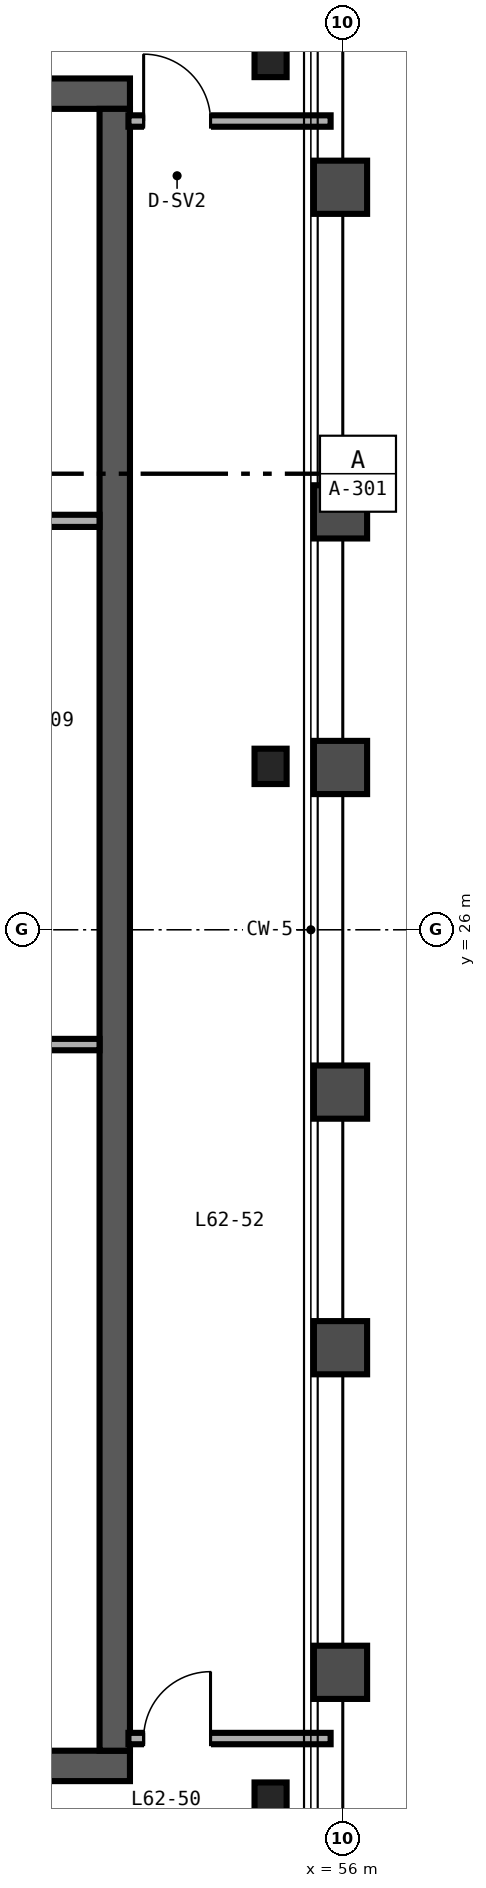
"""IFC4 building model, lengths in metres.
Left out: names, types, materials, properties, quantities, classifications, styles, units other than length and angle.
Written with IfcOpenShell. Run it as: python <this file> out.ifc"""

import sys

from ifc_helpers import new_model, si_unit, direction, frame, frame_2d, origin, origin_2d, place, context, subcontext, project, spatial, rectangle, i_section, extrude, source, transform, mapped, element, fill, save


model = new_model("IFC4")
c1 = context("Model", 3, precision=1e-05, world=origin(), true_north=direction((0.0, 1.0)))
c2 = subcontext(c1, "Body", "Model", "MODEL_VIEW")
j1 = project(units=[si_unit("LENGTHUNIT", "METRE"), si_unit("PLANEANGLEUNIT", "RADIAN")], contexts=[c1])
p1 = place(None, origin())
s1 = spatial("IfcSite", under=j1, at=p1, CompositionType="ELEMENT")
p2 = place(p1, origin())
s2 = spatial("IfcBuilding", under=s1, at=p2, CompositionType="ELEMENT")
p3 = place(p2, frame((0.0, 0.0, 247.2)))
s3 = spatial("IfcBuildingStorey", under=s2, at=p3, CompositionType="ELEMENT", Elevation=247.2)
p4 = place(p3, frame((40.8, 15.0, 0.0), z_axis=(0.0, 0.0, 1.0), x_axis=(1.0, 0.0, 0.0)))
e1 = element("IfcWall", 1, at=p4, inside=s3, PredefinedType="SHEAR", context=c2, shape_type="SweptSolid", body=[
    extrude(rectangle(XDim=12.4, YDim=0.4, at=frame_2d((6.2, 0.0))), origin(), (0.0, 0.0, 1.0), 3.38),
])
p5 = place(p4, frame((4.3, 0.0, 0.0)))
e2 = element("IfcOpeningElement", 2, at=p5, cuts=e1, PredefinedType="OPENING", context=c2, shape_type="SweptSolid", body=[
    extrude(rectangle(XDim=1.0, YDim=2.15, at=frame_2d((0.5, 1.075))), frame((0.0, 0.21, 0.0), z_axis=(0.0, -1.0, 0.0), x_axis=(1.0, 0.0, 0.0)), (0.0, 0.0, 1.0), 0.42),
])
p6 = place(p3, frame((40.8, 37.0, 0.0), z_axis=(0.0, 0.0, 1.0), x_axis=(1.0, 0.0, 0.0)))
e3 = element("IfcWall", 3, at=p6, inside=s3, PredefinedType="SHEAR", context=c2, shape_type="SweptSolid", body=[
    extrude(rectangle(XDim=12.4, YDim=0.4, at=frame_2d((6.2, 0.0))), origin(), (0.0, 0.0, 1.0), 3.38),
])
p7 = place(p6, frame((9.9, 0.0, 0.0)))
e4 = element("IfcOpeningElement", 4, at=p7, cuts=e3, PredefinedType="OPENING", context=c2, shape_type="SweptSolid", body=[
    extrude(rectangle(XDim=1.1, YDim=2.15, at=frame_2d((0.55, 1.075))), frame((0.0, 0.21, 0.0), z_axis=(0.0, -1.0, 0.0), x_axis=(1.0, 0.0, 0.0)), (0.0, 0.0, 1.0), 0.42),
])
p8 = place(p3, frame((53.0, 15.2, 0.0), z_axis=(0.0, 0.0, 1.0), x_axis=(0.0, 1.0, 0.0)))
e5 = element("IfcWall", 5, at=p8, inside=s3, PredefinedType="SHEAR", context=c2, shape_type="SweptSolid", body=[
    extrude(rectangle(XDim=21.6, YDim=0.4, at=frame_2d((10.8, 0.0))), origin(), (0.0, 0.0, 1.0), 3.38),
])
m1 = source(origin(), c2, "Body", "SweptSolid", [
    extrude(i_section(OverallWidth=0.422, OverallDepth=0.465, WebThickness=0.045, FlangeThickness=0.073, FilletRadius=0.025, at=origin_2d()), origin(), (0.0, 0.0, 1.0), 3.38),
])
for number, where, z_axis, x_axis in (
    (6, (55.05, 14.55, 0.0), (0.0, 0.0, 1.0), (1.0, 0.0, 0.0)),
    (7, (55.05, 28.15, 0.0), (0.0, 0.0, 1.0), (1.0, 0.0, 0.0)),
    (8, (55.05, 37.45, 0.0), (0.0, 0.0, 1.0), (1.0, 0.0, 0.0)),
):
    element("IfcColumn", number, at=place(p3, frame(where, z_axis=z_axis, x_axis=x_axis)), inside=s3, PredefinedType="COLUMN", context=c2, shape_type="MappedRepresentation", body=[
        mapped(m1, transform((0.0, 0.0, 0.0), scale=1.0)),
    ])
p9 = place(p3, frame((49.12, 31.38, 0.0), z_axis=(0.0, 0.0, 1.0), x_axis=(1.0, 0.0, 0.0)))
e9 = element("IfcWall", 9, at=p9, inside=s3, PredefinedType="PARTITIONING", context=c2, shape_type="SweptSolid", body=[
    extrude(rectangle(XDim=3.68, YDim=0.16, at=frame_2d((1.84, 0.0))), origin(), (0.0, 0.0, 1.0), 2.48),
])
p10 = place(p3, frame((49.12, 24.49, 0.0), z_axis=(0.0, 0.0, 1.0), x_axis=(1.0, 0.0, 0.0)))
e10 = element("IfcWall", 10, at=p10, inside=s3, PredefinedType="PARTITIONING", context=c2, shape_type="SweptSolid", body=[
    extrude(rectangle(XDim=3.68, YDim=0.15, at=frame_2d((1.84, 0.0))), origin(), (0.0, 0.0, 1.0), 3.38),
])
p11 = place(p3, frame((53.18, 15.36, 0.0), z_axis=(0.0, 0.0, 1.0), x_axis=(1.0, 0.0, 0.0)))
e11 = element("IfcWall", 11, at=p11, inside=s3, PredefinedType="PARTITIONING", context=c2, shape_type="SweptSolid", body=[
    extrude(rectangle(XDim=2.66, YDim=0.15, at=frame_2d((1.33, 0.0))), origin(), (0.0, 0.0, 1.0), 2.601),
])
p12 = place(p11, frame((0.2, 0.0, 0.0)))
e12 = element("IfcOpeningElement", 12, at=p12, cuts=e11, PredefinedType="OPENING", context=c2, shape_type="SweptSolid", body=[
    extrude(rectangle(XDim=0.88, YDim=2.15, at=frame_2d((0.44, 1.075))), frame((0.0, 0.085, 0.0), z_axis=(0.0, -1.0, 0.0), x_axis=(1.0, 0.0, 0.0)), (0.0, 0.0, 1.0), 0.17),
])
p13 = place(p3, frame((53.18, 36.64, 0.0), z_axis=(0.0, 0.0, 1.0), x_axis=(1.0, 0.0, 0.0)))
e13 = element("IfcWall", 13, at=p13, inside=s3, PredefinedType="PARTITIONING", context=c2, shape_type="SweptSolid", body=[
    extrude(rectangle(XDim=2.66, YDim=0.15, at=frame_2d((1.33, 0.0))), origin(), (0.0, 0.0, 1.0), 2.763),
])
p14 = place(p13, frame((0.2, 0.0, 0.0)))
e14 = element("IfcOpeningElement", 14, at=p14, cuts=e13, PredefinedType="OPENING", context=c2, shape_type="SweptSolid", body=[
    extrude(rectangle(XDim=0.88, YDim=2.15, at=frame_2d((0.44, 1.075))), frame((0.0, 0.085, 0.0), z_axis=(0.0, -1.0, 0.0), x_axis=(1.0, 0.0, 0.0)), (0.0, 0.0, 1.0), 0.17),
])
m2 = source(origin(), c2, "Body", "SweptSolid", [
    extrude(rectangle(XDim=0.88, YDim=2.15, at=frame_2d((0.44, 1.075))), frame((0.0, 0.025, 0.0), z_axis=(0.0, -1.0, 0.0), x_axis=(1.0, 0.0, 0.0)), (0.0, 0.0, 1.0), 0.05),
])
p15 = place(p12, origin())
e15 = element("IfcDoor", 15, at=p15, inside=s3, OperationType="SINGLE_SWING_RIGHT", PredefinedType="DOOR", context=c2, shape_type="MappedRepresentation", body=[
    mapped(m2, transform((0.0, 0.0, 0.0), scale=1.0)),
])
fill(e12, e15)
p16 = place(p14, origin())
e16 = element("IfcDoor", 16, at=p16, inside=s3, OperationType="SINGLE_SWING_LEFT", PredefinedType="DOOR", context=c2, shape_type="MappedRepresentation", body=[
    mapped(m2, transform((0.0, 0.0, 0.0), scale=1.0)),
])
fill(e14, e16)
save(model, sys.argv[1])
